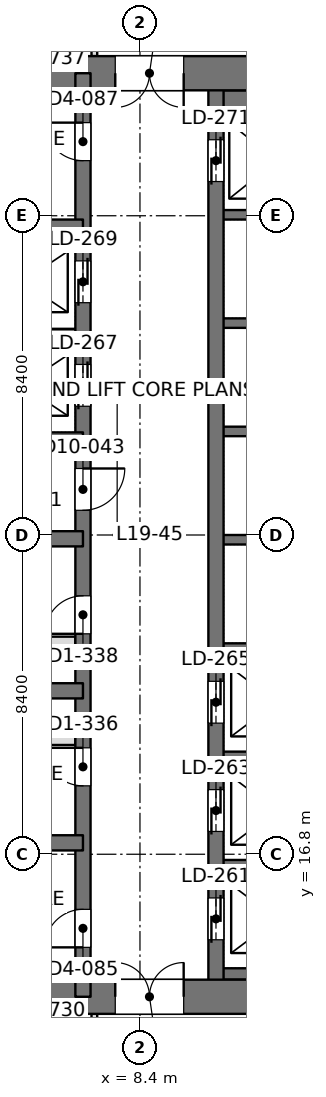
"""IFC4 building model, lengths in metres.
Left out: names, types, materials, properties, quantities, classifications, styles, units other than length and angle.
Written with IfcOpenShell. Run it as: python <this file> out.ifc"""

import sys

from ifc_helpers import new_model, si_unit, direction, frame, frame_2d, origin, place, context, subcontext, project, spatial, rectangle, extrude, element, fill, save


model = new_model("IFC4")
c1 = context("Model", 3, precision=1e-05, world=origin(), true_north=direction((0.0, 1.0)))
c2 = subcontext(c1, "Body", "Model", "MODEL_VIEW")
j1 = project(units=[si_unit("LENGTHUNIT", "METRE"), si_unit("PLANEANGLEUNIT", "RADIAN")], contexts=[c1])
p1 = place(None, origin())
s1 = spatial("IfcSite", under=j1, at=p1, CompositionType="ELEMENT")
p2 = place(p1, origin())
s2 = spatial("IfcBuilding", under=s1, at=p2, CompositionType="ELEMENT")
p3 = place(p2, frame((0.0, 0.0, 86.4)))
s3 = spatial("IfcBuildingStorey", under=s2, at=p3, CompositionType="ELEMENT", Elevation=86.4)
p4 = place(p3, frame((-1.2, 13.05, 0.0), z_axis=(0.0, 0.0, 1.0), x_axis=(1.0, 0.0, 0.0)))
e1 = element("IfcWall", 1, at=p4, inside=s3, PredefinedType="SHEAR", context=c2, shape_type="SweptSolid", body=[
    extrude(rectangle(XDim=18.0, YDim=0.9, at=frame_2d((9.0, 0.0))), origin(), (0.0, 0.0, 1.0), 4.5),
])
p5 = place(p4, frame((8.95, 0.0, 0.0)))
e2 = element("IfcOpeningElement", 2, at=p5, cuts=e1, PredefinedType="OPENING", context=c2, shape_type="SweptSolid", body=[
    extrude(rectangle(XDim=1.8, YDim=2.4, at=frame_2d((0.9, 1.2))), frame((0.0, 0.46, 0.0), z_axis=(0.0, -1.0, 0.0), x_axis=(1.0, 0.0, 0.0)), (0.0, 0.0, 1.0), 0.92),
])
p6 = place(p3, frame((-1.2, 37.35, 0.0), z_axis=(0.0, 0.0, 1.0), x_axis=(1.0, 0.0, 0.0)))
e3 = element("IfcWall", 3, at=p6, inside=s3, PredefinedType="SHEAR", context=c2, shape_type="SweptSolid", body=[
    extrude(rectangle(XDim=18.0, YDim=0.9, at=frame_2d((9.0, 0.0))), origin(), (0.0, 0.0, 1.0), 4.5),
])
p7 = place(p6, frame((8.95, 0.0, 0.0)))
e4 = element("IfcOpeningElement", 4, at=p7, cuts=e3, PredefinedType="OPENING", context=c2, shape_type="SweptSolid", body=[
    extrude(rectangle(XDim=1.8, YDim=2.4, at=frame_2d((0.9, 1.2))), frame((0.0, 0.46, 0.0), z_axis=(0.0, -1.0, 0.0), x_axis=(1.0, 0.0, 0.0)), (0.0, 0.0, 1.0), 0.92),
])
p8 = place(p3, frame((6.9, 13.05, 0.0), z_axis=(0.0, 0.0, 1.0), x_axis=(0.0, 1.0, 0.0)))
e5 = element("IfcWall", 5, at=p8, inside=s3, PredefinedType="SHEAR", context=c2, shape_type="SweptSolid", body=[
    extrude(rectangle(XDim=24.3, YDim=0.4, at=frame_2d((12.15, 0.0))), origin(), (0.0, 0.0, 1.0), 4.5),
])
p9 = place(p8, frame((1.3, 0.0, 0.0)))
e6 = element("IfcOpeningElement", 6, at=p9, cuts=e5, PredefinedType="OPENING", context=c2, shape_type="SweptSolid", body=[
    extrude(rectangle(XDim=1.0, YDim=2.2, at=frame_2d((0.5, 1.1))), frame((0.0, 0.21, 0.0), z_axis=(0.0, -1.0, 0.0), x_axis=(1.0, 0.0, 0.0)), (0.0, 0.0, 1.0), 0.42),
])
p10 = place(p8, frame((22.0, 0.0, 0.0)))
e7 = element("IfcOpeningElement", 7, at=p10, cuts=e5, PredefinedType="OPENING", context=c2, shape_type="SweptSolid", body=[
    extrude(rectangle(XDim=1.0, YDim=2.2, at=frame_2d((0.5, 1.1))), frame((0.0, 0.21, 0.0), z_axis=(0.0, -1.0, 0.0), x_axis=(1.0, 0.0, 0.0)), (0.0, 0.0, 1.0), 0.42),
])
p11 = place(p8, frame((5.55, 0.0, 0.0)))
e8 = element("IfcOpeningElement", 8, at=p11, cuts=e5, PredefinedType="OPENING", context=c2, shape_type="SweptSolid", body=[
    extrude(rectangle(XDim=1.0, YDim=2.2, at=frame_2d((0.5, 1.1))), frame((0.0, 0.21, 0.0), z_axis=(0.0, -1.0, 0.0), x_axis=(1.0, 0.0, 0.0)), (0.0, 0.0, 1.0), 0.42),
])
p12 = place(p8, frame((9.55, 0.0, 0.0)))
e9 = element("IfcOpeningElement", 9, at=p12, cuts=e5, PredefinedType="OPENING", context=c2, shape_type="SweptSolid", body=[
    extrude(rectangle(XDim=1.0, YDim=2.2, at=frame_2d((0.5, 1.1))), frame((0.0, 0.21, 0.0), z_axis=(0.0, -1.0, 0.0), x_axis=(1.0, 0.0, 0.0)), (0.0, 0.0, 1.0), 0.42),
])
p13 = place(p8, frame((12.8, 0.0, 0.0)))
e10 = element("IfcOpeningElement", 10, at=p13, cuts=e5, PredefinedType="OPENING", context=c2, shape_type="SweptSolid", body=[
    extrude(rectangle(XDim=1.1, YDim=2.2, at=frame_2d((0.55, 1.1))), frame((0.0, 0.21, 0.0), z_axis=(0.0, -1.0, 0.0), x_axis=(1.0, 0.0, 0.0)), (0.0, 0.0, 1.0), 0.42),
])
p14 = place(p8, frame((15.538, 0.0, 0.0)))
e11 = element("IfcOpeningElement", 11, at=p14, cuts=e5, PredefinedType="OPENING", context=c2, shape_type="SweptSolid", body=[
    extrude(rectangle(XDim=1.1, YDim=2.2, at=frame_2d((0.55, 1.1))), frame((0.0, 0.21, 0.0), z_axis=(0.0, -1.0, 0.0), x_axis=(1.0, 0.0, 0.0)), (0.0, 0.0, 1.0), 0.42),
])
p15 = place(p8, frame((18.262, 0.0, 0.0)))
e12 = element("IfcOpeningElement", 12, at=p15, cuts=e5, PredefinedType="OPENING", context=c2, shape_type="SweptSolid", body=[
    extrude(rectangle(XDim=1.1, YDim=2.2, at=frame_2d((0.55, 1.1))), frame((0.0, 0.21, 0.0), z_axis=(0.0, -1.0, 0.0), x_axis=(1.0, 0.0, 0.0)), (0.0, 0.0, 1.0), 0.42),
])
p16 = place(p3, frame((10.4, 13.05, 0.0), z_axis=(0.0, 0.0, 1.0), x_axis=(0.0, 1.0, 0.0)))
e13 = element("IfcWall", 13, at=p16, inside=s3, PredefinedType="SHEAR", context=c2, shape_type="SweptSolid", body=[
    extrude(rectangle(XDim=24.3, YDim=0.4, at=frame_2d((12.15, 0.0))), origin(), (0.0, 0.0, 1.0), 4.5),
])
p17 = place(p16, frame((1.5, 0.0, 0.0)))
e14 = element("IfcOpeningElement", 14, at=p17, cuts=e13, PredefinedType="OPENING", context=c2, shape_type="SweptSolid", body=[
    extrude(rectangle(XDim=1.1, YDim=2.2, at=frame_2d((0.55, 1.1))), frame((0.0, 0.21, 0.0), z_axis=(0.0, -1.0, 0.0), x_axis=(1.0, 0.0, 0.0)), (0.0, 0.0, 1.0), 0.42),
])
p18 = place(p16, frame((4.35, 0.0, 0.0)))
e15 = element("IfcOpeningElement", 15, at=p18, cuts=e13, PredefinedType="OPENING", context=c2, shape_type="SweptSolid", body=[
    extrude(rectangle(XDim=1.1, YDim=2.2, at=frame_2d((0.55, 1.1))), frame((0.0, 0.21, 0.0), z_axis=(0.0, -1.0, 0.0), x_axis=(1.0, 0.0, 0.0)), (0.0, 0.0, 1.0), 0.42),
])
p19 = place(p16, frame((7.2, 0.0, 0.0)))
e16 = element("IfcOpeningElement", 16, at=p19, cuts=e13, PredefinedType="OPENING", context=c2, shape_type="SweptSolid", body=[
    extrude(rectangle(XDim=1.1, YDim=2.2, at=frame_2d((0.55, 1.1))), frame((0.0, 0.21, 0.0), z_axis=(0.0, -1.0, 0.0), x_axis=(1.0, 0.0, 0.0)), (0.0, 0.0, 1.0), 0.42),
])
p20 = place(p16, frame((21.45, 0.0, 0.0)))
e17 = element("IfcOpeningElement", 17, at=p20, cuts=e13, PredefinedType="OPENING", context=c2, shape_type="SweptSolid", body=[
    extrude(rectangle(XDim=1.1, YDim=2.2, at=frame_2d((0.55, 1.1))), frame((0.0, 0.21, 0.0), z_axis=(0.0, -1.0, 0.0), x_axis=(1.0, 0.0, 0.0)), (0.0, 0.0, 1.0), 0.42),
])
for number, where, z_axis, x_axis in (
    (18, (-0.75, 17.1, 0.0), (0.0, 0.0, 1.0), (1.0, 0.0, 0.0)),
    (19, (-0.75, 21.1, 0.0), (0.0, 0.0, 1.0), (1.0, 0.0, 0.0)),
    (20, (-0.75, 25.1, 0.0), (0.0, 0.0, 1.0), (1.0, 0.0, 0.0)),
    (21, (-0.75, 27.7, 0.0), (0.0, 0.0, 1.0), (1.0, 0.0, 0.0)),
    (22, (-0.75, 33.3, 0.0), (0.0, 0.0, 1.0), (1.0, 0.0, 0.0)),
):
    element("IfcWall", number, at=place(p3, frame(where, z_axis=z_axis, x_axis=x_axis)), inside=s3, PredefinedType="SHEAR", context=c2, shape_type="SweptSolid", body=[
        extrude(rectangle(XDim=7.65, YDim=0.4, at=frame_2d((3.825, 0.0))), origin(), (0.0, 0.0, 1.0), 4.5),
    ])
p21 = place(p3, frame((3.7, 30.5, 0.0), z_axis=(0.0, 0.0, 1.0), x_axis=(1.0, 0.0, 0.0)))
e23 = element("IfcWall", 23, at=p21, inside=s3, PredefinedType="SHEAR", context=c2, shape_type="SweptSolid", body=[
    extrude(rectangle(XDim=3.2, YDim=0.25, at=frame_2d((1.6, 0.0))), origin(), (0.0, 0.0, 1.0), 4.5),
])
p22 = place(p3, frame((10.4, 13.65, 0.0), z_axis=(0.0, 0.0, 1.0), x_axis=(1.0, 0.0, 0.0)))
e24 = element("IfcWall", 24, at=p22, inside=s3, PredefinedType="SHEAR", context=c2, shape_type="SweptSolid", body=[
    extrude(rectangle(XDim=3.2, YDim=0.3, at=frame_2d((1.6, 0.0))), origin(), (0.0, 0.0, 1.0), 4.5),
])
for number, where, z_axis, x_axis in (
    (25, (10.4, 16.525, 0.0), (0.0, 0.0, 1.0), (1.0, 0.0, 0.0)),
    (26, (10.4, 19.375, 0.0), (0.0, 0.0, 1.0), (1.0, 0.0, 0.0)),
    (27, (10.4, 22.225, 0.0), (0.0, 0.0, 1.0), (1.0, 0.0, 0.0)),
    (28, (10.4, 25.075, 0.0), (0.0, 0.0, 1.0), (1.0, 0.0, 0.0)),
    (29, (10.4, 27.925, 0.0), (0.0, 0.0, 1.0), (1.0, 0.0, 0.0)),
    (30, (10.4, 30.775, 0.0), (0.0, 0.0, 1.0), (1.0, 0.0, 0.0)),
    (31, (10.4, 33.625, 0.0), (0.0, 0.0, 1.0), (1.0, 0.0, 0.0)),
):
    element("IfcWall", number, at=place(p3, frame(where, z_axis=z_axis, x_axis=x_axis)), inside=s3, PredefinedType="SHEAR", context=c2, shape_type="SweptSolid", body=[
        extrude(rectangle(XDim=3.2, YDim=0.25, at=frame_2d((1.6, 0.0))), origin(), (0.0, 0.0, 1.0), 4.5),
    ])
p23 = place(p3, frame((10.4, 36.625, 0.0), z_axis=(0.0, 0.0, 1.0), x_axis=(1.0, 0.0, 0.0)))
e32 = element("IfcWall", 32, at=p23, inside=s3, PredefinedType="SHEAR", context=c2, shape_type="SweptSolid", body=[
    extrude(rectangle(XDim=3.2, YDim=0.55, at=frame_2d((1.6, 0.0))), origin(), (0.0, 0.0, 1.0), 4.5),
])
p24 = place(p3, frame((7.2, 10.474, 0.0), z_axis=(0.0, 0.0, 1.0), x_axis=(0.0, 1.0, 0.0)))
e33 = element("IfcWall", 33, at=p24, inside=s3, PredefinedType="PARTITIONING", context=c2, shape_type="SweptSolid", body=[
    extrude(rectangle(XDim=2.128, YDim=0.15, at=frame_2d((1.064, 0.0))), origin(), (0.0, 0.0, 1.0), 4.3),
])
p25 = place(p24, frame((0.526, 0.0, 0.0)))
e34 = element("IfcOpeningElement", 34, at=p25, cuts=e33, PredefinedType="OPENING", context=c2, shape_type="SweptSolid", body=[
    extrude(rectangle(XDim=1.0, YDim=2.2, at=frame_2d((0.5, 1.1))), frame((0.0, 0.085, 0.0), z_axis=(0.0, -1.0, 0.0), x_axis=(1.0, 0.0, 0.0)), (0.0, 0.0, 1.0), 0.17),
])
p26 = place(p3, frame((7.2, 37.8, 0.0), z_axis=(0.0, 0.0, 1.0), x_axis=(0.0, 1.0, 0.0)))
e35 = element("IfcWall", 35, at=p26, inside=s3, PredefinedType="PARTITIONING", context=c2, shape_type="SweptSolid", body=[
    extrude(rectangle(XDim=2.126, YDim=0.15, at=frame_2d((1.063, 0.0))), origin(), (0.0, 0.0, 1.0), 4.3),
])
p27 = place(p26, frame((0.6, 0.0, 0.0)))
e36 = element("IfcOpeningElement", 36, at=p27, cuts=e35, PredefinedType="OPENING", context=c2, shape_type="SweptSolid", body=[
    extrude(rectangle(XDim=1.0, YDim=2.2, at=frame_2d((0.5, 1.1))), frame((0.0, 0.085, 0.0), z_axis=(0.0, -1.0, 0.0), x_axis=(1.0, 0.0, 0.0)), (0.0, 0.0, 1.0), 0.17),
])
p28 = place(p3, frame((0.1, 22.4, 0.0), z_axis=(0.0, 0.0, 1.0), x_axis=(1.0, 0.0, 0.0)))
e37 = element("IfcWall", 37, at=p28, inside=s3, PredefinedType="PARTITIONING", context=c2, shape_type="SweptSolid", body=[
    extrude(rectangle(XDim=6.6, YDim=0.25, at=frame_2d((3.3, 0.0))), origin(), (0.0, 0.0, 1.0), 4.3),
])
p29 = place(p28, frame((2.875, 0.0, 0.0)))
e38 = element("IfcOpeningElement", 38, at=p29, cuts=e37, PredefinedType="OPENING", context=c2, shape_type="SweptSolid", body=[
    extrude(rectangle(XDim=0.9, YDim=2.2, at=frame_2d((0.45, 1.1))), frame((0.0, 0.135, 0.0), z_axis=(0.0, -1.0, 0.0), x_axis=(1.0, 0.0, 0.0)), (0.0, 0.0, 1.0), 0.27),
])
p30 = place(p3, frame((0.1, 19.8, 0.0), z_axis=(0.0, 0.0, 1.0), x_axis=(1.0, 0.0, 0.0)))
e39 = element("IfcWall", 39, at=p30, inside=s3, PredefinedType="PARTITIONING", context=c2, shape_type="SweptSolid", body=[
    extrude(rectangle(XDim=6.6, YDim=0.25, at=frame_2d((3.3, 0.0))), origin(), (0.0, 0.0, 1.0), 4.3),
])
p31 = place(p30, frame((2.875, 0.0, 0.0)))
e40 = element("IfcOpeningElement", 40, at=p31, cuts=e39, PredefinedType="OPENING", context=c2, shape_type="SweptSolid", body=[
    extrude(rectangle(XDim=0.9, YDim=2.2, at=frame_2d((0.45, 1.1))), frame((0.0, 0.135, 0.0), z_axis=(0.0, -1.0, 0.0), x_axis=(1.0, 0.0, 0.0)), (0.0, 0.0, 1.0), 0.27),
])
p32 = place(p5, origin())
e41 = element("IfcDoor", 41, at=p32, inside=s3, OperationType="DOUBLE_DOOR_SINGLE_SWING", PredefinedType="DOOR", context=c2, shape_type="SweptSolid", body=[
    extrude(rectangle(XDim=1.8, YDim=2.4, at=frame_2d((0.9, 1.2))), frame((0.0, 0.025, 0.0), z_axis=(0.0, -1.0, 0.0), x_axis=(1.0, 0.0, 0.0)), (0.0, 0.0, 1.0), 0.05),
])
fill(e2, e41)
p33 = place(p7, frame((1.8, 0.0, 0.0), z_axis=(0.0, 0.0, 1.0), x_axis=(-1.0, 0.0, 0.0)))
e42 = element("IfcDoor", 42, at=p33, inside=s3, OperationType="DOUBLE_DOOR_SINGLE_SWING", PredefinedType="DOOR", context=c2, shape_type="SweptSolid", body=[
    extrude(rectangle(XDim=1.8, YDim=2.4, at=frame_2d((0.9, 1.2))), frame((0.0, 0.025, 0.0), z_axis=(0.0, -1.0, 0.0), x_axis=(1.0, 0.0, 0.0)), (0.0, 0.0, 1.0), 0.05),
])
fill(e4, e42)
p34 = place(p9, origin())
e43 = element("IfcDoor", 43, at=p34, inside=s3, OperationType="SINGLE_SWING_LEFT", PredefinedType="DOOR", context=c2, shape_type="SweptSolid", body=[
    extrude(rectangle(XDim=1.0, YDim=2.2, at=frame_2d((0.5, 1.1))), frame((0.0, 0.025, 0.0), z_axis=(0.0, -1.0, 0.0), x_axis=(1.0, 0.0, 0.0)), (0.0, 0.0, 1.0), 0.05),
])
fill(e6, e43)
p35 = place(p10, origin())
e44 = element("IfcDoor", 44, at=p35, inside=s3, OperationType="SINGLE_SWING_RIGHT", PredefinedType="DOOR", context=c2, shape_type="SweptSolid", body=[
    extrude(rectangle(XDim=1.0, YDim=2.2, at=frame_2d((0.5, 1.1))), frame((0.0, 0.025, 0.0), z_axis=(0.0, -1.0, 0.0), x_axis=(1.0, 0.0, 0.0)), (0.0, 0.0, 1.0), 0.05),
])
fill(e7, e44)
p36 = place(p11, origin())
e45 = element("IfcDoor", 45, at=p36, inside=s3, OperationType="SINGLE_SWING_RIGHT", PredefinedType="DOOR", context=c2, shape_type="SweptSolid", body=[
    extrude(rectangle(XDim=1.0, YDim=2.2, at=frame_2d((0.5, 1.1))), frame((0.0, 0.025, 0.0), z_axis=(0.0, -1.0, 0.0), x_axis=(1.0, 0.0, 0.0)), (0.0, 0.0, 1.0), 0.05),
])
fill(e8, e45)
p37 = place(p12, origin())
e46 = element("IfcDoor", 46, at=p37, inside=s3, OperationType="SINGLE_SWING_LEFT", PredefinedType="DOOR", context=c2, shape_type="SweptSolid", body=[
    extrude(rectangle(XDim=1.0, YDim=2.2, at=frame_2d((0.5, 1.1))), frame((0.0, 0.025, 0.0), z_axis=(0.0, -1.0, 0.0), x_axis=(1.0, 0.0, 0.0)), (0.0, 0.0, 1.0), 0.05),
])
fill(e9, e46)
p38 = place(p13, frame((1.1, 0.0, 0.0), z_axis=(0.0, 0.0, 1.0), x_axis=(-1.0, 0.0, 0.0)))
e47 = element("IfcDoor", 47, at=p38, inside=s3, OperationType="SINGLE_SWING_LEFT", PredefinedType="DOOR", context=c2, shape_type="SweptSolid", body=[
    extrude(rectangle(XDim=1.1, YDim=2.2, at=frame_2d((0.55, 1.1))), frame((0.0, 0.025, 0.0), z_axis=(0.0, -1.0, 0.0), x_axis=(1.0, 0.0, 0.0)), (0.0, 0.0, 1.0), 0.05),
])
fill(e10, e47)
p39 = place(p17, origin())
e48 = element("IfcDoor", 48, at=p39, inside=s3, OperationType="DOUBLE_DOOR_SLIDING", PredefinedType="DOOR", context=c2, shape_type="SweptSolid", body=[
    extrude(rectangle(XDim=1.1, YDim=2.2, at=frame_2d((0.55, 1.1))), frame((0.0, 0.025, 0.0), z_axis=(0.0, -1.0, 0.0), x_axis=(1.0, 0.0, 0.0)), (0.0, 0.0, 1.0), 0.05),
])
fill(e14, e48)
p40 = place(p18, origin())
e49 = element("IfcDoor", 49, at=p40, inside=s3, OperationType="DOUBLE_DOOR_SLIDING", PredefinedType="DOOR", context=c2, shape_type="SweptSolid", body=[
    extrude(rectangle(XDim=1.1, YDim=2.2, at=frame_2d((0.55, 1.1))), frame((0.0, 0.025, 0.0), z_axis=(0.0, -1.0, 0.0), x_axis=(1.0, 0.0, 0.0)), (0.0, 0.0, 1.0), 0.05),
])
fill(e15, e49)
p41 = place(p19, origin())
e50 = element("IfcDoor", 50, at=p41, inside=s3, OperationType="DOUBLE_DOOR_SLIDING", PredefinedType="DOOR", context=c2, shape_type="SweptSolid", body=[
    extrude(rectangle(XDim=1.1, YDim=2.2, at=frame_2d((0.55, 1.1))), frame((0.0, 0.025, 0.0), z_axis=(0.0, -1.0, 0.0), x_axis=(1.0, 0.0, 0.0)), (0.0, 0.0, 1.0), 0.05),
])
fill(e16, e50)
p42 = place(p20, origin())
e51 = element("IfcDoor", 51, at=p42, inside=s3, OperationType="DOUBLE_DOOR_SLIDING", PredefinedType="DOOR", context=c2, shape_type="SweptSolid", body=[
    extrude(rectangle(XDim=1.1, YDim=2.2, at=frame_2d((0.55, 1.1))), frame((0.0, 0.025, 0.0), z_axis=(0.0, -1.0, 0.0), x_axis=(1.0, 0.0, 0.0)), (0.0, 0.0, 1.0), 0.05),
])
fill(e17, e51)
p43 = place(p14, origin())
e52 = element("IfcDoor", 52, at=p43, inside=s3, OperationType="DOUBLE_DOOR_SLIDING", PredefinedType="DOOR", context=c2, shape_type="SweptSolid", body=[
    extrude(rectangle(XDim=1.1, YDim=2.2, at=frame_2d((0.55, 1.1))), frame((0.0, 0.025, 0.0), z_axis=(0.0, -1.0, 0.0), x_axis=(1.0, 0.0, 0.0)), (0.0, 0.0, 1.0), 0.05),
])
fill(e11, e52)
p44 = place(p15, origin())
e53 = element("IfcDoor", 53, at=p44, inside=s3, OperationType="DOUBLE_DOOR_SLIDING", PredefinedType="DOOR", context=c2, shape_type="SweptSolid", body=[
    extrude(rectangle(XDim=1.1, YDim=2.2, at=frame_2d((0.55, 1.1))), frame((0.0, 0.025, 0.0), z_axis=(0.0, -1.0, 0.0), x_axis=(1.0, 0.0, 0.0)), (0.0, 0.0, 1.0), 0.05),
])
fill(e12, e53)
save(model, sys.argv[1])
